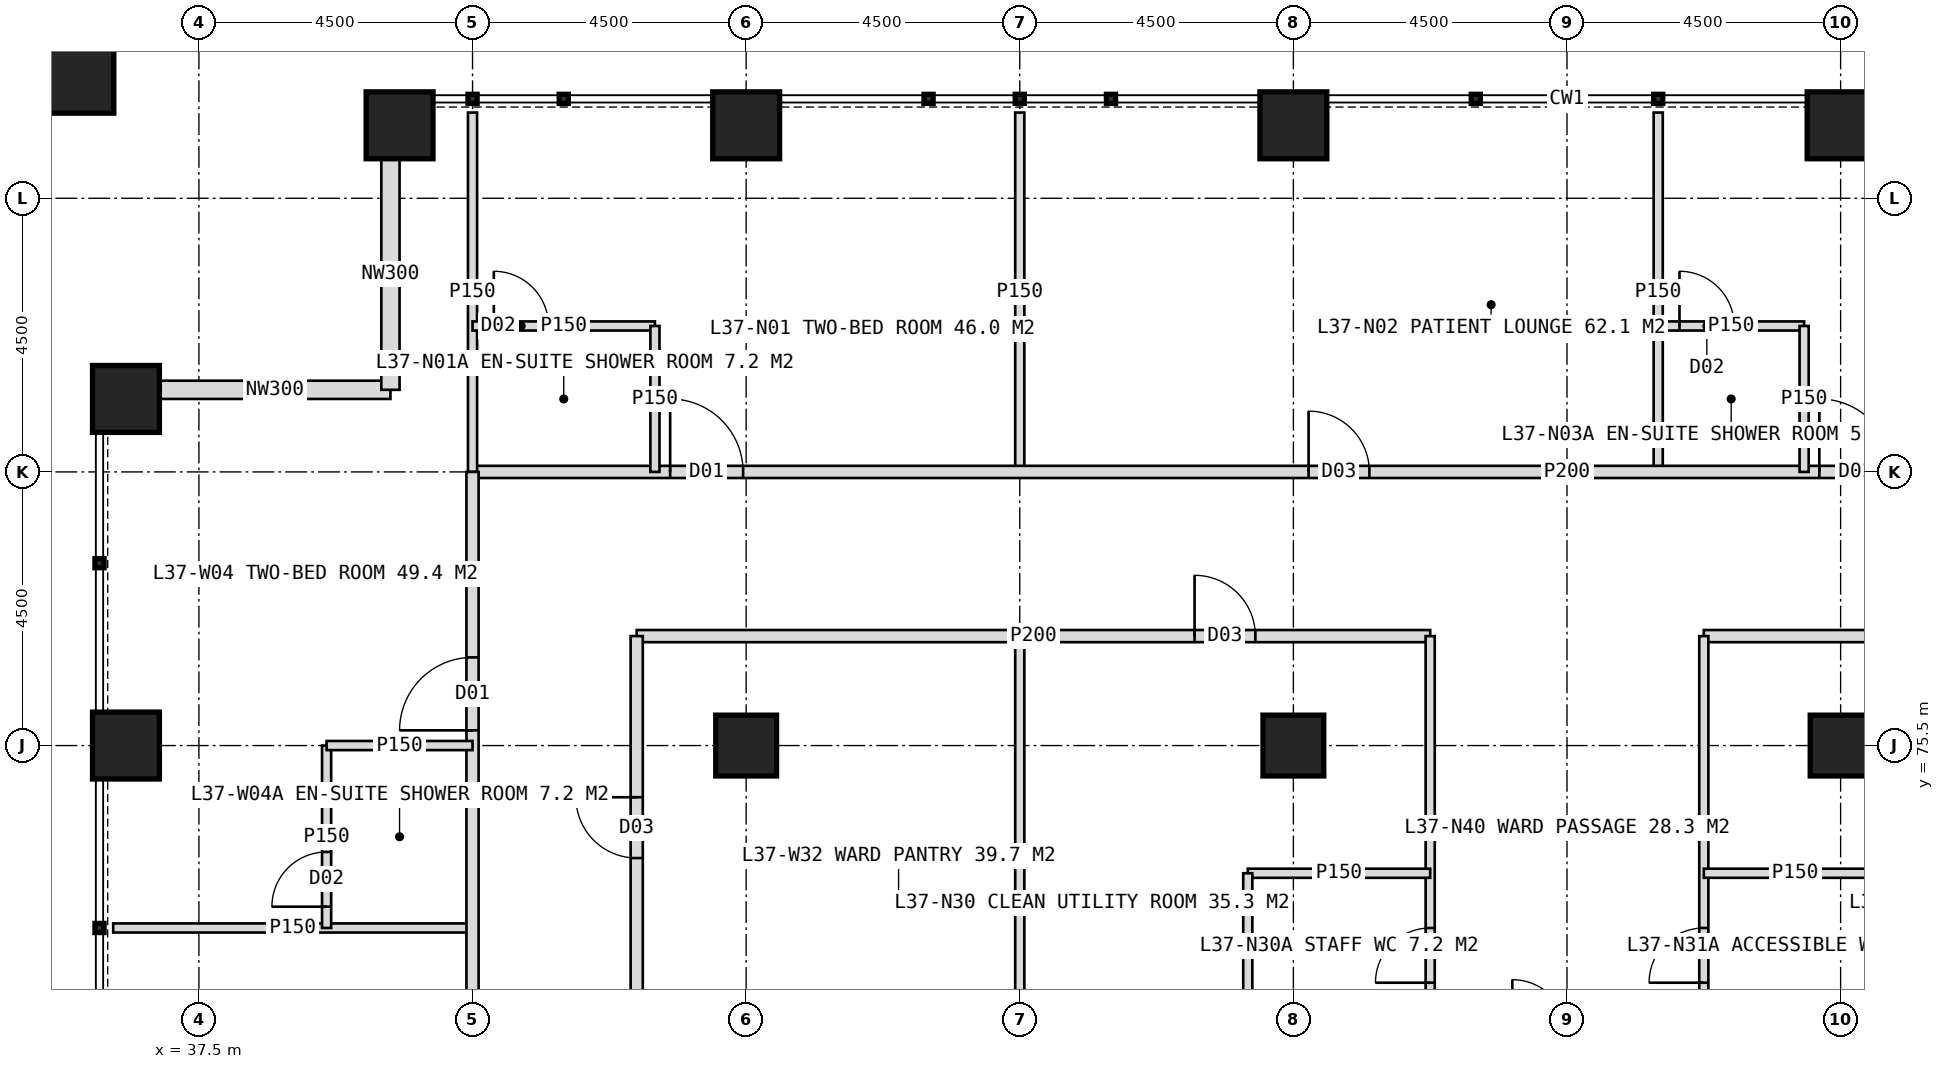
"""IFC4 building model, lengths in metres.
Left out: names, types, materials, properties, quantities, classifications, styles, units other than length and angle.
Written with IfcOpenShell. Run it as: python <this file> out.ifc"""

import sys

from ifc_helpers import new_model, si_unit, direction, frame, frame_2d, origin, origin_2d, place, context, subcontext, project, spatial, rectangle, hollow_rectangle, extrude, element, fill, save


model = new_model("IFC4")
c1 = context("Model", 3, precision=1e-05, world=origin(), true_north=direction((0.0, 1.0)))
c2 = subcontext(c1, "Body", "Model", "MODEL_VIEW")
j1 = project(units=[si_unit("LENGTHUNIT", "METRE"), si_unit("PLANEANGLEUNIT", "RADIAN")], contexts=[c1])
p1 = place(None, origin())
s1 = spatial("IfcSite", under=j1, at=p1, CompositionType="ELEMENT")
p2 = place(p1, origin())
s2 = spatial("IfcBuilding", under=s1, at=p2, CompositionType="ELEMENT")
p3 = place(p2, frame((0.0, 0.0, 156.0)))
s3 = spatial("IfcBuildingStorey", under=s2, at=p3, CompositionType="ELEMENT", Elevation=156.0)
for number, where, z_axis, x_axis in (
    (1, (46.5, 75.5, 0.0), (0.0, 0.0, 1.0), (1.0, 0.0, 0.0)),
    (2, (55.5, 75.5, 0.0), (0.0, 0.0, 1.0), (1.0, 0.0, 0.0)),
    (3, (64.5, 75.5, 0.0), (0.0, 0.0, 1.0), (1.0, 0.0, 0.0)),
):
    element("IfcColumn", number, at=place(p3, frame(where, z_axis=z_axis, x_axis=x_axis)), inside=s3, PredefinedType="COLUMN", context=c2, shape_type="SweptSolid", body=[
        extrude(hollow_rectangle(XDim=1.0, YDim=1.0, WallThickness=0.1, at=origin_2d()), origin(), (0.0, 0.0, 1.0), 4.0),
    ])
for number, where, z_axis, x_axis in (
    (4, (40.8, 85.7, 0.0), (0.0, 0.0, 1.0), (1.0, 0.0, 0.0)),
    (5, (46.5, 85.7, 0.0), (0.0, 0.0, 1.0), (1.0, 0.0, 0.0)),
    (6, (55.5, 85.7, 0.0), (0.0, 0.0, 1.0), (1.0, 0.0, 0.0)),
    (7, (64.5, 85.7, 0.0), (0.0, 0.0, 1.0), (1.0, 0.0, 0.0)),
    (8, (36.3, 75.5, 0.0), (0.0, 0.0, 1.0), (1.0, 0.0, 0.0)),
    (9, (36.3, 81.2, 0.0), (0.0, 0.0, 1.0), (1.0, 0.0, 0.0)),
):
    element("IfcColumn", number, at=place(p3, frame(where, z_axis=z_axis, x_axis=x_axis)), inside=s3, PredefinedType="COLUMN", context=c2, shape_type="SweptSolid", body=[
        extrude(hollow_rectangle(XDim=1.1, YDim=1.1, WallThickness=0.1, at=origin_2d()), origin(), (0.0, 0.0, 1.0), 4.0),
    ])
p4 = place(p3, frame((35.4, 86.6, 0.0), z_axis=(0.0, 0.0, 1.0), x_axis=(1.0, 0.0, 0.0)))
e10 = element("IfcColumn", 10, at=p4, inside=s3, PredefinedType="COLUMN", context=c2, shape_type="SweptSolid", body=[
    extrude(hollow_rectangle(XDim=1.4, YDim=1.4, WallThickness=0.08, at=origin_2d()), origin(), (0.0, 0.0, 1.0), 4.0),
])
for number, where, z_axis, x_axis in (
    (11, (36.85, 81.35, 0.0), (0.0, 0.0, 1.0), (1.0, 0.0, 0.0)),
    (12, (40.65, 81.35, 0.0), (0.0, 0.0, 1.0), (0.0, 1.0, 0.0)),
):
    element("IfcWall", number, at=place(p3, frame(where, z_axis=z_axis, x_axis=x_axis)), inside=s3, PredefinedType="ELEMENTEDWALL", context=c2, shape_type="SweptSolid", body=[
        extrude(rectangle(XDim=3.8, YDim=0.3, at=frame_2d((1.9, 0.0))), origin(), (0.0, 0.0, 1.0), 4.0),
    ])
for number, where, z_axis, x_axis in (
    (13, (51.0, 80.0, 0.0), (0.0, 0.0, 1.0), (0.0, 1.0, 0.0)),
    (14, (61.5, 80.0, 0.0), (0.0, 0.0, 1.0), (0.0, 1.0, 0.0)),
):
    element("IfcWall", number, at=place(p3, frame(where, z_axis=z_axis, x_axis=x_axis)), inside=s3, PredefinedType="PARTITIONING", context=c2, shape_type="SweptSolid", body=[
        extrude(rectangle(XDim=5.91, YDim=0.15, at=frame_2d((2.955, 0.0))), origin(), (0.0, 0.0, 1.0), 3.75),
    ])
p5 = place(p3, frame((42.0, 80.0, 0.0), z_axis=(0.0, 0.0, 1.0), x_axis=(1.0, 0.0, 0.0)))
e15 = element("IfcWall", 15, at=p5, inside=s3, PredefinedType="PARTITIONING", context=c2, shape_type="SweptSolid", body=[
    extrude(rectangle(XDim=36.0, YDim=0.2, at=frame_2d((18.0, 0.0))), origin(), (0.0, 0.0, 1.0), 3.75),
])
p6 = place(p5, frame((3.25, 0.0, 0.0)))
e16 = element("IfcOpeningElement", 16, at=p6, cuts=e15, PredefinedType="OPENING", context=c2, shape_type="SweptSolid", body=[
    extrude(rectangle(XDim=1.2, YDim=2.2, at=frame_2d((0.6, 1.1))), frame((0.0, 0.11, 0.0), z_axis=(0.0, -1.0, 0.0), x_axis=(1.0, 0.0, 0.0)), (0.0, 0.0, 1.0), 0.22),
])
p7 = place(p5, frame((13.75, 0.0, 0.0)))
e17 = element("IfcOpeningElement", 17, at=p7, cuts=e15, PredefinedType="OPENING", context=c2, shape_type="SweptSolid", body=[
    extrude(rectangle(XDim=1.0, YDim=2.1, at=frame_2d((0.5, 1.05))), frame((0.0, 0.11, 0.0), z_axis=(0.0, -1.0, 0.0), x_axis=(1.0, 0.0, 0.0)), (0.0, 0.0, 1.0), 0.22),
])
p8 = place(p5, frame((22.15, 0.0, 0.0)))
e18 = element("IfcOpeningElement", 18, at=p8, cuts=e15, PredefinedType="OPENING", context=c2, shape_type="SweptSolid", body=[
    extrude(rectangle(XDim=1.2, YDim=2.2, at=frame_2d((0.6, 1.1))), frame((0.0, 0.11, 0.0), z_axis=(0.0, -1.0, 0.0), x_axis=(1.0, 0.0, 0.0)), (0.0, 0.0, 1.0), 0.22),
])
p9 = place(p3, frame((42.0, 80.0, 0.0), z_axis=(0.0, 0.0, 1.0), x_axis=(0.0, 1.0, 0.0)))
e19 = element("IfcWall", 19, at=p9, inside=s3, PredefinedType="PARTITIONING", context=c2, shape_type="SweptSolid", body=[
    extrude(rectangle(XDim=5.91, YDim=0.15, at=frame_2d((2.955, 0.0))), origin(), (0.0, 0.0, 1.0), 3.75),
])
p10 = place(p3, frame((42.0, 82.4, 0.0), z_axis=(0.0, 0.0, 1.0), x_axis=(1.0, 0.0, 0.0)))
e20 = element("IfcWall", 20, at=p10, inside=s3, PredefinedType="PARTITIONING", context=c2, shape_type="SweptSolid", body=[
    extrude(rectangle(XDim=3.0, YDim=0.15, at=frame_2d((1.5, 0.0))), origin(), (0.0, 0.0, 1.0), 3.75),
])
p11 = place(p10, frame((0.35, 0.0, 0.0)))
e21 = element("IfcOpeningElement", 21, at=p11, cuts=e20, PredefinedType="OPENING", context=c2, shape_type="SweptSolid", body=[
    extrude(rectangle(XDim=0.9, YDim=2.1, at=frame_2d((0.45, 1.05))), frame((0.0, 0.085, 0.0), z_axis=(0.0, -1.0, 0.0), x_axis=(1.0, 0.0, 0.0)), (0.0, 0.0, 1.0), 0.17),
])
p12 = place(p3, frame((45.0, 80.0, 0.0), z_axis=(0.0, 0.0, 1.0), x_axis=(0.0, 1.0, 0.0)))
e22 = element("IfcWall", 22, at=p12, inside=s3, PredefinedType="PARTITIONING", context=c2, shape_type="SweptSolid", body=[
    extrude(rectangle(XDim=2.4, YDim=0.15, at=frame_2d((1.2, 0.0))), origin(), (0.0, 0.0, 1.0), 3.75),
])
p13 = place(p3, frame((61.5, 82.4, 0.0), z_axis=(0.0, 0.0, 1.0), x_axis=(1.0, 0.0, 0.0)))
e23 = element("IfcWall", 23, at=p13, inside=s3, PredefinedType="PARTITIONING", context=c2, shape_type="SweptSolid", body=[
    extrude(rectangle(XDim=2.4, YDim=0.15, at=frame_2d((1.2, 0.0))), origin(), (0.0, 0.0, 1.0), 3.75),
])
p14 = place(p13, frame((0.35, 0.0, 0.0)))
e24 = element("IfcOpeningElement", 24, at=p14, cuts=e23, PredefinedType="OPENING", context=c2, shape_type="SweptSolid", body=[
    extrude(rectangle(XDim=0.9, YDim=2.1, at=frame_2d((0.45, 1.05))), frame((0.0, 0.085, 0.0), z_axis=(0.0, -1.0, 0.0), x_axis=(1.0, 0.0, 0.0)), (0.0, 0.0, 1.0), 0.17),
])
p15 = place(p3, frame((63.9, 80.0, 0.0), z_axis=(0.0, 0.0, 1.0), x_axis=(0.0, 1.0, 0.0)))
e25 = element("IfcWall", 25, at=p15, inside=s3, PredefinedType="PARTITIONING", context=c2, shape_type="SweptSolid", body=[
    extrude(rectangle(XDim=2.4, YDim=0.15, at=frame_2d((1.2, 0.0))), origin(), (0.0, 0.0, 1.0), 3.75),
])
p16 = place(p3, frame((51.0, 71.0, 0.0), z_axis=(0.0, 0.0, 1.0), x_axis=(0.0, 1.0, 0.0)))
e26 = element("IfcWall", 26, at=p16, inside=s3, PredefinedType="PARTITIONING", context=c2, shape_type="SweptSolid", body=[
    extrude(rectangle(XDim=6.3, YDim=0.15, at=frame_2d((3.15, 0.0))), origin(), (0.0, 0.0, 1.0), 3.75),
])
p17 = place(p3, frame((44.7, 77.3, 0.0), z_axis=(0.0, 0.0, 1.0), x_axis=(1.0, 0.0, 0.0)))
e27 = element("IfcWall", 27, at=p17, inside=s3, PredefinedType="PARTITIONING", context=c2, shape_type="SweptSolid", body=[
    extrude(rectangle(XDim=13.05, YDim=0.2, at=frame_2d((6.525, 0.0))), origin(), (0.0, 0.0, 1.0), 3.75),
])
p18 = place(p17, frame((9.175, 0.0, 0.0)))
e28 = element("IfcOpeningElement", 28, at=p18, cuts=e27, PredefinedType="OPENING", context=c2, shape_type="SweptSolid", body=[
    extrude(rectangle(XDim=1.0, YDim=2.1, at=frame_2d((0.5, 1.05))), frame((0.0, 0.11, 0.0), z_axis=(0.0, -1.0, 0.0), x_axis=(1.0, 0.0, 0.0)), (0.0, 0.0, 1.0), 0.22),
])
p19 = place(p3, frame((62.25, 77.3, 0.0), z_axis=(0.0, 0.0, 1.0), x_axis=(1.0, 0.0, 0.0)))
e29 = element("IfcWall", 29, at=p19, inside=s3, PredefinedType="PARTITIONING", context=c2, shape_type="SweptSolid", body=[
    extrude(rectangle(XDim=6.75, YDim=0.2, at=frame_2d((3.375, 0.0))), origin(), (0.0, 0.0, 1.0), 3.75),
])
p20 = place(p19, frame((4.375, 0.0, 0.0)))
e30 = element("IfcOpeningElement", 30, at=p20, cuts=e29, PredefinedType="OPENING", context=c2, shape_type="SweptSolid", body=[
    extrude(rectangle(XDim=1.0, YDim=2.1, at=frame_2d((0.5, 1.05))), frame((0.0, 0.11, 0.0), z_axis=(0.0, -1.0, 0.0), x_axis=(1.0, 0.0, 0.0)), (0.0, 0.0, 1.0), 0.22),
])
p21 = place(p3, frame((57.75, 71.0, 0.0), z_axis=(0.0, 0.0, 1.0), x_axis=(0.0, 1.0, 0.0)))
e31 = element("IfcWall", 31, at=p21, inside=s3, PredefinedType="PARTITIONING", context=c2, shape_type="SweptSolid", body=[
    extrude(rectangle(XDim=6.3, YDim=0.15, at=frame_2d((3.15, 0.0))), origin(), (0.0, 0.0, 1.0), 3.75),
])
p22 = place(p21, frame((0.6, 0.0, 0.0)))
e32 = element("IfcOpeningElement", 32, at=p22, cuts=e31, PredefinedType="OPENING", context=c2, shape_type="SweptSolid", body=[
    extrude(rectangle(XDim=0.9, YDim=2.1, at=frame_2d((0.45, 1.05))), frame((0.0, 0.085, 0.0), z_axis=(0.0, -1.0, 0.0), x_axis=(1.0, 0.0, 0.0)), (0.0, 0.0, 1.0), 0.17),
])
p23 = place(p3, frame((62.25, 71.0, 0.0), z_axis=(0.0, 0.0, 1.0), x_axis=(0.0, 1.0, 0.0)))
e33 = element("IfcWall", 33, at=p23, inside=s3, PredefinedType="PARTITIONING", context=c2, shape_type="SweptSolid", body=[
    extrude(rectangle(XDim=6.3, YDim=0.15, at=frame_2d((3.15, 0.0))), origin(), (0.0, 0.0, 1.0), 3.75),
])
p24 = place(p23, frame((0.6, 0.0, 0.0)))
e34 = element("IfcOpeningElement", 34, at=p24, cuts=e33, PredefinedType="OPENING", context=c2, shape_type="SweptSolid", body=[
    extrude(rectangle(XDim=0.9, YDim=2.1, at=frame_2d((0.45, 1.05))), frame((0.0, 0.085, 0.0), z_axis=(0.0, -1.0, 0.0), x_axis=(1.0, 0.0, 0.0)), (0.0, 0.0, 1.0), 0.17),
])
p25 = place(p3, frame((54.75, 73.4, 0.0), z_axis=(0.0, 0.0, 1.0), x_axis=(1.0, 0.0, 0.0)))
e35 = element("IfcWall", 35, at=p25, inside=s3, PredefinedType="PARTITIONING", context=c2, shape_type="SweptSolid", body=[
    extrude(rectangle(XDim=3.0, YDim=0.15, at=frame_2d((1.5, 0.0))), origin(), (0.0, 0.0, 1.0), 3.75),
])
p26 = place(p3, frame((54.75, 71.0, 0.0), z_axis=(0.0, 0.0, 1.0), x_axis=(0.0, 1.0, 0.0)))
e36 = element("IfcWall", 36, at=p26, inside=s3, PredefinedType="PARTITIONING", context=c2, shape_type="SweptSolid", body=[
    extrude(rectangle(XDim=2.4, YDim=0.15, at=frame_2d((1.2, 0.0))), origin(), (0.0, 0.0, 1.0), 3.75),
])
p27 = place(p3, frame((62.25, 73.4, 0.0), z_axis=(0.0, 0.0, 1.0), x_axis=(1.0, 0.0, 0.0)))
e37 = element("IfcWall", 37, at=p27, inside=s3, PredefinedType="PARTITIONING", context=c2, shape_type="SweptSolid", body=[
    extrude(rectangle(XDim=3.0, YDim=0.15, at=frame_2d((1.5, 0.0))), origin(), (0.0, 0.0, 1.0), 3.75),
])
p28 = place(p3, frame((42.0, 72.5, 0.0), z_axis=(0.0, 0.0, 1.0), x_axis=(-1.0, 0.0, 0.0)))
e38 = element("IfcWall", 38, at=p28, inside=s3, PredefinedType="PARTITIONING", context=c2, shape_type="SweptSolid", body=[
    extrude(rectangle(XDim=5.91, YDim=0.15, at=frame_2d((2.955, 0.0))), origin(), (0.0, 0.0, 1.0), 3.75),
])
p29 = place(p3, frame((42.0, 44.0, 0.0), z_axis=(0.0, 0.0, 1.0), x_axis=(0.0, 1.0, 0.0)))
e39 = element("IfcWall", 39, at=p29, inside=s3, PredefinedType="PARTITIONING", context=c2, shape_type="SweptSolid", body=[
    extrude(rectangle(XDim=36.0, YDim=0.2, at=frame_2d((18.0, 0.0))), origin(), (0.0, 0.0, 1.0), 3.75),
])
p30 = place(p29, frame((3.25, 0.0, 0.0)))
e40 = element("IfcOpeningElement", 40, at=p30, cuts=e39, PredefinedType="OPENING", context=c2, shape_type="SweptSolid", body=[
    extrude(rectangle(XDim=1.2, YDim=2.2, at=frame_2d((0.6, 1.1))), frame((0.0, 0.11, 0.0), z_axis=(0.0, -1.0, 0.0), x_axis=(1.0, 0.0, 0.0)), (0.0, 0.0, 1.0), 0.22),
])
p31 = place(p29, frame((12.25, 0.0, 0.0)))
e41 = element("IfcOpeningElement", 41, at=p31, cuts=e39, PredefinedType="OPENING", context=c2, shape_type="SweptSolid", body=[
    extrude(rectangle(XDim=1.2, YDim=2.2, at=frame_2d((0.6, 1.1))), frame((0.0, 0.11, 0.0), z_axis=(0.0, -1.0, 0.0), x_axis=(1.0, 0.0, 0.0)), (0.0, 0.0, 1.0), 0.22),
])
p32 = place(p29, frame((21.25, 0.0, 0.0)))
e42 = element("IfcOpeningElement", 42, at=p32, cuts=e39, PredefinedType="OPENING", context=c2, shape_type="SweptSolid", body=[
    extrude(rectangle(XDim=1.2, YDim=2.2, at=frame_2d((0.6, 1.1))), frame((0.0, 0.11, 0.0), z_axis=(0.0, -1.0, 0.0), x_axis=(1.0, 0.0, 0.0)), (0.0, 0.0, 1.0), 0.22),
])
p33 = place(p29, frame((31.75, 0.0, 0.0)))
e43 = element("IfcOpeningElement", 43, at=p33, cuts=e39, PredefinedType="OPENING", context=c2, shape_type="SweptSolid", body=[
    extrude(rectangle(XDim=1.2, YDim=2.2, at=frame_2d((0.6, 1.1))), frame((0.0, 0.11, 0.0), z_axis=(0.0, -1.0, 0.0), x_axis=(1.0, 0.0, 0.0)), (0.0, 0.0, 1.0), 0.22),
])
p34 = place(p3, frame((39.6, 72.5, 0.0), z_axis=(0.0, 0.0, 1.0), x_axis=(0.0, 1.0, 0.0)))
e44 = element("IfcWall", 44, at=p34, inside=s3, PredefinedType="PARTITIONING", context=c2, shape_type="SweptSolid", body=[
    extrude(rectangle(XDim=3.0, YDim=0.15, at=frame_2d((1.5, 0.0))), origin(), (0.0, 0.0, 1.0), 3.75),
])
p35 = place(p34, frame((0.35, 0.0, 0.0)))
e45 = element("IfcOpeningElement", 45, at=p35, cuts=e44, PredefinedType="OPENING", context=c2, shape_type="SweptSolid", body=[
    extrude(rectangle(XDim=0.9, YDim=2.1, at=frame_2d((0.45, 1.05))), frame((0.0, 0.085, 0.0), z_axis=(0.0, -1.0, 0.0), x_axis=(1.0, 0.0, 0.0)), (0.0, 0.0, 1.0), 0.17),
])
p36 = place(p3, frame((42.0, 75.5, 0.0), z_axis=(0.0, 0.0, 1.0), x_axis=(-1.0, 0.0, 0.0)))
e46 = element("IfcWall", 46, at=p36, inside=s3, PredefinedType="PARTITIONING", context=c2, shape_type="SweptSolid", body=[
    extrude(rectangle(XDim=2.4, YDim=0.15, at=frame_2d((1.2, 0.0))), origin(), (0.0, 0.0, 1.0), 2.95),
])
p37 = place(p3, frame((44.7, 62.0, 0.0), z_axis=(0.0, 0.0, 1.0), x_axis=(0.0, 1.0, 0.0)))
e47 = element("IfcWall", 47, at=p37, inside=s3, PredefinedType="PARTITIONING", context=c2, shape_type="SweptSolid", body=[
    extrude(rectangle(XDim=15.3, YDim=0.2, at=frame_2d((7.65, 0.0))), origin(), (0.0, 0.0, 1.0), 3.75),
])
p38 = place(p37, frame((4.0, 0.0, 0.0)))
e48 = element("IfcOpeningElement", 48, at=p38, cuts=e47, PredefinedType="OPENING", context=c2, shape_type="SweptSolid", body=[
    extrude(rectangle(XDim=1.0, YDim=2.1, at=frame_2d((0.5, 1.05))), frame((0.0, 0.11, 0.0), z_axis=(0.0, -1.0, 0.0), x_axis=(1.0, 0.0, 0.0)), (0.0, 0.0, 1.0), 0.22),
])
p39 = place(p37, frame((11.65, 0.0, 0.0)))
e49 = element("IfcOpeningElement", 49, at=p39, cuts=e47, PredefinedType="OPENING", context=c2, shape_type="SweptSolid", body=[
    extrude(rectangle(XDim=1.0, YDim=2.1, at=frame_2d((0.5, 1.05))), frame((0.0, 0.11, 0.0), z_axis=(0.0, -1.0, 0.0), x_axis=(1.0, 0.0, 0.0)), (0.0, 0.0, 1.0), 0.22),
])
p40 = place(p6, origin())
e50 = element("IfcDoor", 50, at=p40, inside=s3, OperationType="SINGLE_SWING_LEFT", PredefinedType="DOOR", context=c2, shape_type="SweptSolid", body=[
    extrude(rectangle(XDim=1.2, YDim=2.2, at=frame_2d((0.6, 1.1))), frame((0.0, 0.025, 0.0), z_axis=(0.0, -1.0, 0.0), x_axis=(1.0, 0.0, 0.0)), (0.0, 0.0, 1.0), 0.05),
])
fill(e16, e50)
p41 = place(p11, origin())
e51 = element("IfcDoor", 51, at=p41, inside=s3, OperationType="SINGLE_SWING_LEFT", PredefinedType="DOOR", context=c2, shape_type="SweptSolid", body=[
    extrude(rectangle(XDim=0.9, YDim=2.1, at=frame_2d((0.45, 1.05))), frame((0.0, 0.025, 0.0), z_axis=(0.0, -1.0, 0.0), x_axis=(1.0, 0.0, 0.0)), (0.0, 0.0, 1.0), 0.05),
])
fill(e21, e51)
p42 = place(p7, origin())
e52 = element("IfcDoor", 52, at=p42, inside=s3, OperationType="SINGLE_SWING_LEFT", PredefinedType="DOOR", context=c2, shape_type="SweptSolid", body=[
    extrude(rectangle(XDim=1.0, YDim=2.1, at=frame_2d((0.5, 1.05))), frame((0.0, 0.025, 0.0), z_axis=(0.0, -1.0, 0.0), x_axis=(1.0, 0.0, 0.0)), (0.0, 0.0, 1.0), 0.05),
])
fill(e17, e52)
p43 = place(p8, origin())
e53 = element("IfcDoor", 53, at=p43, inside=s3, OperationType="SINGLE_SWING_LEFT", PredefinedType="DOOR", context=c2, shape_type="SweptSolid", body=[
    extrude(rectangle(XDim=1.2, YDim=2.2, at=frame_2d((0.6, 1.1))), frame((0.0, 0.025, 0.0), z_axis=(0.0, -1.0, 0.0), x_axis=(1.0, 0.0, 0.0)), (0.0, 0.0, 1.0), 0.05),
])
fill(e18, e53)
p44 = place(p14, origin())
e54 = element("IfcDoor", 54, at=p44, inside=s3, OperationType="SINGLE_SWING_LEFT", PredefinedType="DOOR", context=c2, shape_type="SweptSolid", body=[
    extrude(rectangle(XDim=0.9, YDim=2.1, at=frame_2d((0.45, 1.05))), frame((0.0, 0.025, 0.0), z_axis=(0.0, -1.0, 0.0), x_axis=(1.0, 0.0, 0.0)), (0.0, 0.0, 1.0), 0.05),
])
fill(e24, e54)
p45 = place(p22, origin())
e55 = element("IfcDoor", 55, at=p45, inside=s3, OperationType="SINGLE_SWING_LEFT", PredefinedType="DOOR", context=c2, shape_type="SweptSolid", body=[
    extrude(rectangle(XDim=0.9, YDim=2.1, at=frame_2d((0.45, 1.05))), frame((0.0, 0.025, 0.0), z_axis=(0.0, -1.0, 0.0), x_axis=(1.0, 0.0, 0.0)), (0.0, 0.0, 1.0), 0.05),
])
fill(e32, e55)
p46 = place(p18, origin())
e56 = element("IfcDoor", 56, at=p46, inside=s3, OperationType="SINGLE_SWING_LEFT", PredefinedType="DOOR", context=c2, shape_type="SweptSolid", body=[
    extrude(rectangle(XDim=1.0, YDim=2.1, at=frame_2d((0.5, 1.05))), frame((0.0, 0.025, 0.0), z_axis=(0.0, -1.0, 0.0), x_axis=(1.0, 0.0, 0.0)), (0.0, 0.0, 1.0), 0.05),
])
fill(e28, e56)
p47 = place(p24, origin())
e57 = element("IfcDoor", 57, at=p47, inside=s3, OperationType="SINGLE_SWING_LEFT", PredefinedType="DOOR", context=c2, shape_type="SweptSolid", body=[
    extrude(rectangle(XDim=0.9, YDim=2.1, at=frame_2d((0.45, 1.05))), frame((0.0, 0.025, 0.0), z_axis=(0.0, -1.0, 0.0), x_axis=(1.0, 0.0, 0.0)), (0.0, 0.0, 1.0), 0.05),
])
fill(e34, e57)
p48 = place(p33, origin())
e58 = element("IfcDoor", 58, at=p48, inside=s3, OperationType="SINGLE_SWING_LEFT", PredefinedType="DOOR", context=c2, shape_type="SweptSolid", body=[
    extrude(rectangle(XDim=1.2, YDim=2.2, at=frame_2d((0.6, 1.1))), frame((0.0, 0.025, 0.0), z_axis=(0.0, -1.0, 0.0), x_axis=(1.0, 0.0, 0.0)), (0.0, 0.0, 1.0), 0.05),
])
fill(e43, e58)
p49 = place(p35, origin())
e59 = element("IfcDoor", 59, at=p49, inside=s3, OperationType="SINGLE_SWING_LEFT", PredefinedType="DOOR", context=c2, shape_type="SweptSolid", body=[
    extrude(rectangle(XDim=0.9, YDim=2.1, at=frame_2d((0.45, 1.05))), frame((0.0, 0.025, 0.0), z_axis=(0.0, -1.0, 0.0), x_axis=(1.0, 0.0, 0.0)), (0.0, 0.0, 1.0), 0.05),
])
fill(e45, e59)
p50 = place(p39, origin())
e60 = element("IfcDoor", 60, at=p50, inside=s3, OperationType="SINGLE_SWING_RIGHT", PredefinedType="DOOR", context=c2, shape_type="SweptSolid", body=[
    extrude(rectangle(XDim=1.0, YDim=2.1, at=frame_2d((0.5, 1.05))), frame((0.0, 0.025, 0.0), z_axis=(0.0, -1.0, 0.0), x_axis=(1.0, 0.0, 0.0)), (0.0, 0.0, 1.0), 0.05),
])
fill(e49, e60)
save(model, sys.argv[1])
